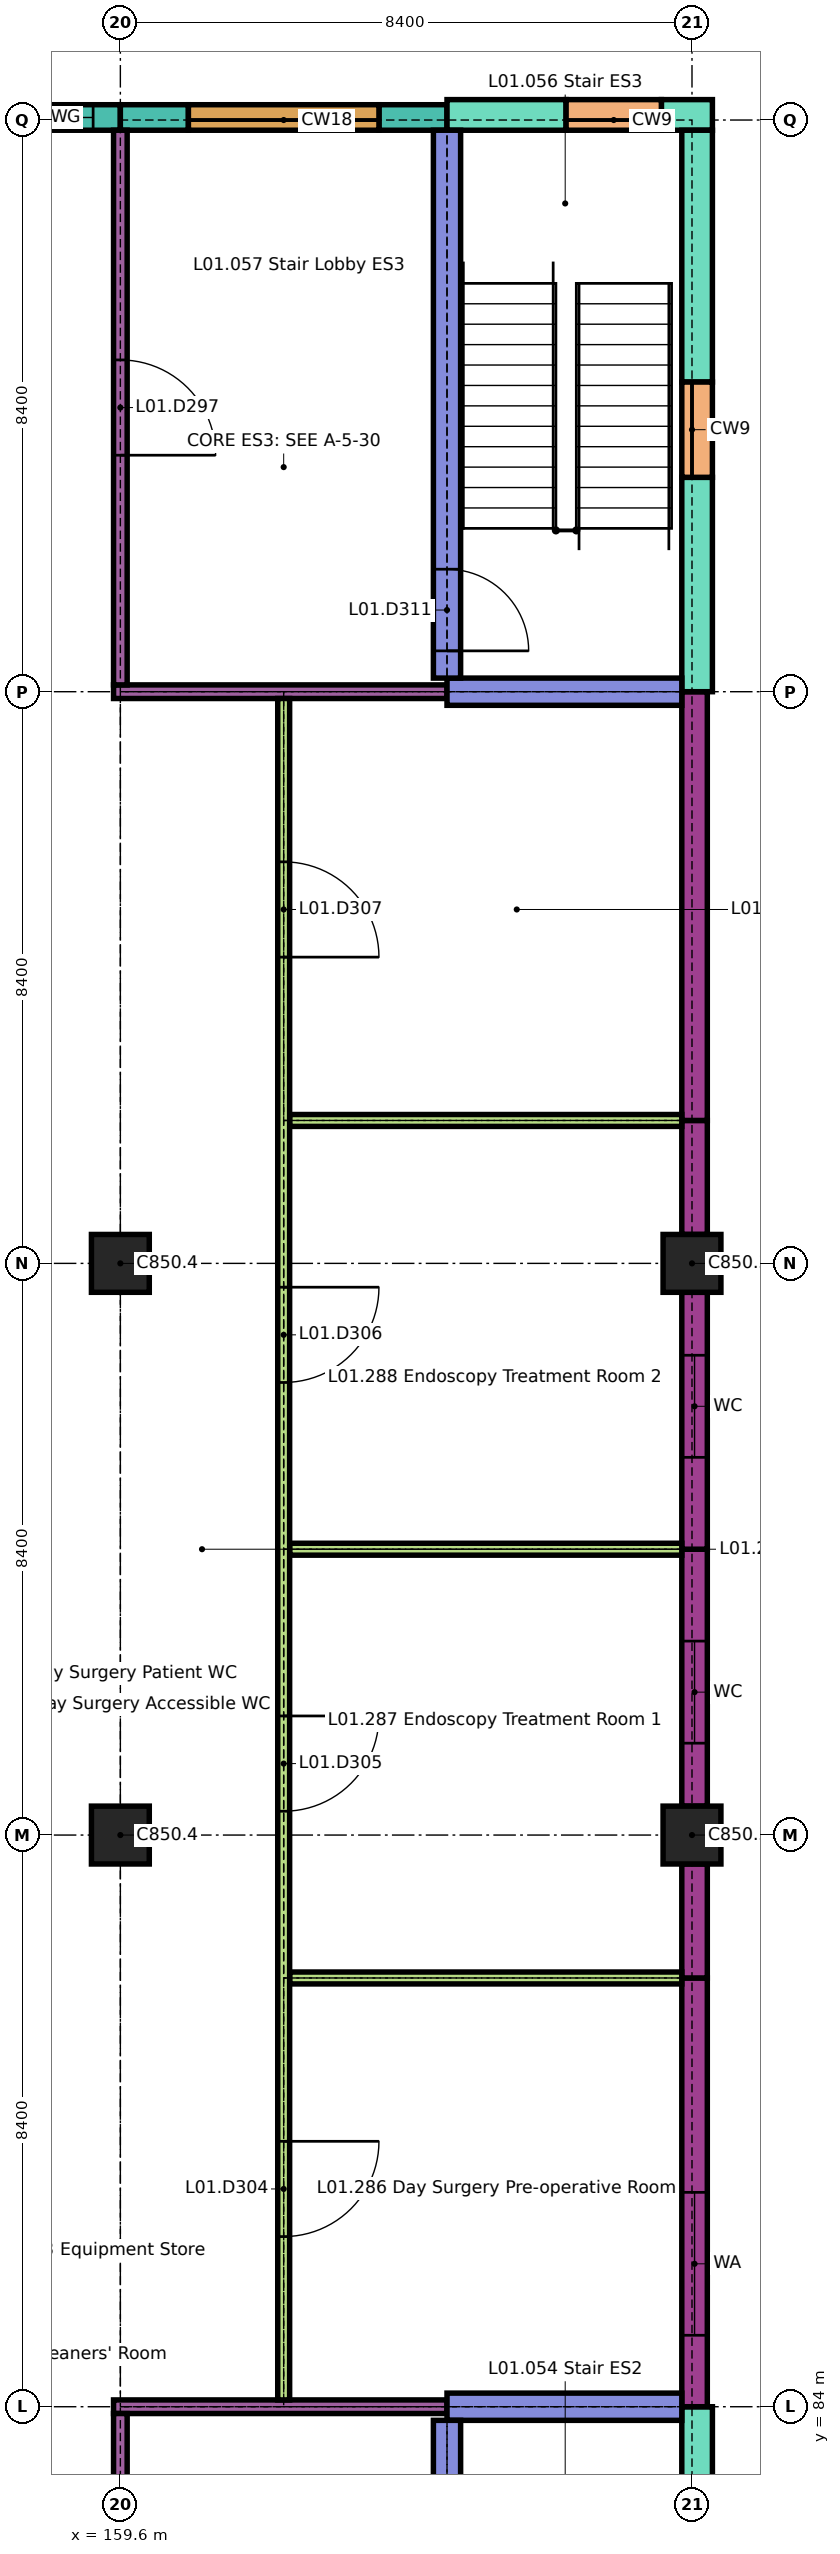
"""IFC4 building model, lengths in metres.
Left out: names, types, materials, properties, quantities, classifications, styles, units other than length and angle.
Written with IfcOpenShell. Run it as: python <this file> out.ifc"""

import sys

from ifc_helpers import new_model, si_unit, direction, frame, frame_2d, origin, origin_2d, place, context, subcontext, project, spatial, rectangle, extrude, element, fill, save


model = new_model("IFC4")
c1 = context("Model", 3, precision=1e-05, world=origin(), true_north=direction((0.0, 1.0)))
c2 = subcontext(c1, "Body", "Model", "MODEL_VIEW")
j1 = project(units=[si_unit("LENGTHUNIT", "METRE"), si_unit("PLANEANGLEUNIT", "RADIAN")], contexts=[c1])
p1 = place(None, origin())
s1 = spatial("IfcSite", under=j1, at=p1, CompositionType="ELEMENT")
p2 = place(p1, origin())
s2 = spatial("IfcBuilding", under=s1, at=p2, CompositionType="ELEMENT")
p3 = place(p2, frame((0.0, 0.0, 4.5)))
s3 = spatial("IfcBuildingStorey", under=s2, at=p3, CompositionType="ELEMENT", Elevation=4.5)
for number, where, z_axis, x_axis in (
    (1, (159.6, 92.4, 0.0), (0.0, 0.0, 1.0), (1.0, 0.0, 0.0)),
    (2, (168.0, 92.4, 0.0), (0.0, 0.0, 1.0), (1.0, 0.0, 0.0)),
    (3, (159.6, 100.8, 0.0), (0.0, 0.0, 1.0), (1.0, 0.0, 0.0)),
    (4, (168.0, 100.8, 0.0), (0.0, 0.0, 1.0), (1.0, 0.0, 0.0)),
):
    element("IfcColumn", number, at=place(p3, frame(where, z_axis=z_axis, x_axis=x_axis)), inside=s3, PredefinedType="COLUMN", context=c2, shape_type="SweptSolid", body=[
        extrude(rectangle(XDim=0.85, YDim=0.85, at=origin_2d()), origin(), (0.0, 0.0, 1.0), 3.45),
    ])
p4 = place(p3, frame((157.0, 117.637, 0.0), z_axis=(0.0, 0.0, 1.0), x_axis=(1.0, 0.0, 0.0)))
e5 = element("IfcWall", 5, at=p4, inside=s3, PredefinedType="SOLIDWALL", context=c2, shape_type="SweptSolid", body=[
    extrude(rectangle(XDim=2.6, YDim=0.375, at=frame_2d((1.3, 0.0))), origin(), (0.0, 0.0, 1.0), 3.45),
])
p5 = place(p4, frame((0.4, 0.0, 0.9)))
e6 = element("IfcOpeningElement", 6, at=p5, cuts=e5, PredefinedType="OPENING", context=c2, shape_type="SweptSolid", body=[
    extrude(rectangle(XDim=1.8, YDim=1.5, at=frame_2d((0.9, 0.75))), frame((0.0, 0.198, 0.0), z_axis=(0.0, -1.0, 0.0), x_axis=(1.0, 0.0, 0.0)), (0.0, 0.0, 1.0), 0.395),
])
for number, where, z_axis, x_axis in (
    (7, (159.6, 117.637, 0.0), (0.0, 0.0, 1.0), (1.0, 0.0, 0.0)),
    (8, (163.4, 117.637, 0.0), (0.0, 0.0, 1.0), (1.0, 0.0, 0.0)),
):
    element("IfcWall", number, at=place(p3, frame(where, z_axis=z_axis, x_axis=x_axis)), inside=s3, PredefinedType="SOLIDWALL", context=c2, shape_type="SweptSolid", body=[
        extrude(rectangle(XDim=1.0, YDim=0.375, at=frame_2d((0.5, 0.0))), origin(), (0.0, 0.0, 1.0), 3.45),
    ])
p6 = place(p3, frame((160.6, 117.637, 0.0), z_axis=(0.0, 0.0, 1.0), x_axis=(1.0, 0.0, 0.0)))
e9 = element("IfcWall", 9, at=p6, inside=s3, PredefinedType="SOLIDWALL", context=c2, shape_type="SweptSolid", body=[
    extrude(rectangle(XDim=2.8, YDim=0.375, at=frame_2d((1.4, 0.0))), origin(), (0.0, 0.0, 1.0), 0.6),
])
p7 = place(p3, frame((164.4, 117.675, 0.0), z_axis=(0.0, 0.0, 1.0), x_axis=(1.0, 0.0, 0.0)))
e10 = element("IfcWall", 10, at=p7, inside=s3, PredefinedType="SOLIDWALL", context=c2, shape_type="SweptSolid", body=[
    extrude(rectangle(XDim=1.75, YDim=0.45, at=frame_2d((0.875, 0.0))), origin(), (0.0, 0.0, 1.0), 3.45),
])
p8 = place(p3, frame((167.55, 117.675, 0.0), z_axis=(0.0, 0.0, 1.0), x_axis=(1.0, 0.0, 0.0)))
e11 = element("IfcWall", 11, at=p8, inside=s3, PredefinedType="SOLIDWALL", context=c2, shape_type="SweptSolid", body=[
    extrude(rectangle(XDim=0.75, YDim=0.45, at=frame_2d((0.375, 0.0))), origin(), (0.0, 0.0, 1.0), 3.45),
])
p9 = place(p3, frame((166.15, 117.675, 0.0), z_axis=(0.0, 0.0, 1.0), x_axis=(1.0, 0.0, 0.0)))
e12 = element("IfcWall", 12, at=p9, inside=s3, PredefinedType="SOLIDWALL", context=c2, shape_type="SweptSolid", body=[
    extrude(rectangle(XDim=1.4, YDim=0.45, at=frame_2d((0.7, 0.0))), origin(), (0.0, 0.0, 1.0), 0.6),
])
p10 = place(p3, frame((168.075, 80.15, 0.0), z_axis=(0.0, 0.0, 1.0), x_axis=(0.0, 1.0, 0.0)))
e13 = element("IfcWall", 13, at=p10, inside=s3, PredefinedType="SOLIDWALL", context=c2, shape_type="SweptSolid", body=[
    extrude(rectangle(XDim=3.85, YDim=0.45, at=frame_2d((1.925, 0.0))), origin(), (0.0, 0.0, 1.0), 3.45),
])
p11 = place(p3, frame((168.038, 84.0, 0.0), z_axis=(0.0, 0.0, 1.0), x_axis=(0.0, 1.0, 0.0)))
e14 = element("IfcWall", 14, at=p11, inside=s3, PredefinedType="SOLIDWALL", context=c2, shape_type="SweptSolid", body=[
    extrude(rectangle(XDim=6.3, YDim=0.375, at=frame_2d((3.15, 0.0))), origin(), (0.0, 0.0, 1.0), 3.15),
])
p12 = place(p11, frame((1.05, 0.0, 0.9)))
e15 = element("IfcOpeningElement", 15, at=p12, cuts=e14, PredefinedType="OPENING", context=c2, shape_type="SweptSolid", body=[
    extrude(rectangle(XDim=2.1, YDim=1.5, at=frame_2d((1.05, 0.75))), frame((0.0, 0.198, 0.0), z_axis=(0.0, -1.0, 0.0), x_axis=(1.0, 0.0, 0.0)), (0.0, 0.0, 1.0), 0.395),
])
p13 = place(p3, frame((168.038, 90.3, 0.0), z_axis=(0.0, 0.0, 1.0), x_axis=(0.0, 1.0, 0.0)))
e16 = element("IfcWall", 16, at=p13, inside=s3, PredefinedType="SOLIDWALL", context=c2, shape_type="SweptSolid", body=[
    extrude(rectangle(XDim=1.675, YDim=0.375, at=frame_2d((0.837, 0.0))), origin(), (0.0, 0.0, 1.0), 3.15),
])
p14 = place(p3, frame((168.038, 92.825, 0.0), z_axis=(0.0, 0.0, 1.0), x_axis=(0.0, 1.0, 0.0)))
e17 = element("IfcWall", 17, at=p14, inside=s3, PredefinedType="SOLIDWALL", context=c2, shape_type="SweptSolid", body=[
    extrude(rectangle(XDim=3.775, YDim=0.375, at=frame_2d((1.888, 0.0))), origin(), (0.0, 0.0, 1.0), 3.15),
])
p15 = place(p14, frame((0.925, 0.0, 0.9)))
e18 = element("IfcOpeningElement", 18, at=p15, cuts=e17, PredefinedType="OPENING", context=c2, shape_type="SweptSolid", body=[
    extrude(rectangle(XDim=1.5, YDim=1.5, at=frame_2d((0.75, 0.75))), frame((0.0, 0.198, 0.0), z_axis=(0.0, -1.0, 0.0), x_axis=(1.0, 0.0, 0.0)), (0.0, 0.0, 1.0), 0.395),
])
p16 = place(p3, frame((168.038, 96.6, 0.0), z_axis=(0.0, 0.0, 1.0), x_axis=(0.0, 1.0, 0.0)))
e19 = element("IfcWall", 19, at=p16, inside=s3, PredefinedType="SOLIDWALL", context=c2, shape_type="SweptSolid", body=[
    extrude(rectangle(XDim=3.775, YDim=0.375, at=frame_2d((1.887, 0.0))), origin(), (0.0, 0.0, 1.0), 3.15),
])
p17 = place(p16, frame((1.35, 0.0, 0.9)))
e20 = element("IfcOpeningElement", 20, at=p17, cuts=e19, PredefinedType="OPENING", context=c2, shape_type="SweptSolid", body=[
    extrude(rectangle(XDim=1.5, YDim=1.5, at=frame_2d((0.75, 0.75))), frame((0.0, 0.198, 0.0), z_axis=(0.0, -1.0, 0.0), x_axis=(1.0, 0.0, 0.0)), (0.0, 0.0, 1.0), 0.395),
])
p18 = place(p3, frame((168.038, 101.225, 0.0), z_axis=(0.0, 0.0, 1.0), x_axis=(0.0, 1.0, 0.0)))
e21 = element("IfcWall", 21, at=p18, inside=s3, PredefinedType="SOLIDWALL", context=c2, shape_type="SweptSolid", body=[
    extrude(rectangle(XDim=1.675, YDim=0.375, at=frame_2d((0.837, 0.0))), origin(), (0.0, 0.0, 1.0), 3.15),
])
p19 = place(p3, frame((168.038, 102.9, 0.0), z_axis=(0.0, 0.0, 1.0), x_axis=(0.0, 1.0, 0.0)))
e22 = element("IfcWall", 22, at=p19, inside=s3, PredefinedType="SOLIDWALL", context=c2, shape_type="SweptSolid", body=[
    extrude(rectangle(XDim=6.3, YDim=0.375, at=frame_2d((3.15, 0.0))), origin(), (0.0, 0.0, 1.0), 3.15),
])
p20 = place(p3, frame((168.075, 109.2, 0.0), z_axis=(0.0, 0.0, 1.0), x_axis=(0.0, 1.0, 0.0)))
e23 = element("IfcWall", 23, at=p20, inside=s3, PredefinedType="SOLIDWALL", context=c2, shape_type="SweptSolid", body=[
    extrude(rectangle(XDim=3.15, YDim=0.45, at=frame_2d((1.575, 0.0))), origin(), (0.0, 0.0, 1.0), 3.45),
])
p21 = place(p3, frame((168.075, 113.75, 0.0), z_axis=(0.0, 0.0, 1.0), x_axis=(0.0, 1.0, 0.0)))
e24 = element("IfcWall", 24, at=p21, inside=s3, PredefinedType="SOLIDWALL", context=c2, shape_type="SweptSolid", body=[
    extrude(rectangle(XDim=3.7, YDim=0.45, at=frame_2d((1.85, 0.0))), origin(), (0.0, 0.0, 1.0), 3.45),
])
p22 = place(p3, frame((168.075, 112.35, 0.0), z_axis=(0.0, 0.0, 1.0), x_axis=(0.0, 1.0, 0.0)))
e25 = element("IfcWall", 25, at=p22, inside=s3, PredefinedType="SOLIDWALL", context=c2, shape_type="SweptSolid", body=[
    extrude(rectangle(XDim=1.4, YDim=0.45, at=frame_2d((0.7, 0.0))), origin(), (0.0, 0.0, 1.0), 0.6),
])
p23 = place(p3, frame((159.5, 84.0, 0.0), z_axis=(0.0, 0.0, 1.0), x_axis=(1.0, 0.0, 0.0)))
e26 = element("IfcWall", 26, at=p23, inside=s3, PredefinedType="PARTITIONING", context=c2, shape_type="SweptSolid", body=[
    extrude(rectangle(XDim=4.9, YDim=0.2, at=frame_2d((2.45, 0.0))), origin(), (0.0, 0.0, 1.0), 3.45),
])
p24 = place(p3, frame((164.4, 84.0, 0.0), z_axis=(0.0, 0.0, 1.0), x_axis=(1.0, 0.0, 0.0)))
e27 = element("IfcWall", 27, at=p24, inside=s3, PredefinedType="SHEAR", context=c2, shape_type="SweptSolid", body=[
    extrude(rectangle(XDim=3.45, YDim=0.4, at=frame_2d((1.725, 0.0))), origin(), (0.0, 0.0, 1.0), 3.45),
])
for number, where, z_axis, x_axis in (
    (28, (162.087, 90.3, 0.0), (0.0, 0.0, 1.0), (1.0, 0.0, 0.0)),
    (29, (162.087, 96.6, 0.0), (0.0, 0.0, 1.0), (1.0, 0.0, 0.0)),
    (30, (162.087, 102.9, 0.0), (0.0, 0.0, 1.0), (1.0, 0.0, 0.0)),
):
    element("IfcWall", number, at=place(p3, frame(where, z_axis=z_axis, x_axis=x_axis)), inside=s3, PredefinedType="PARTITIONING", context=c2, shape_type="SweptSolid", body=[
        extrude(rectangle(XDim=5.763, YDim=0.175, at=frame_2d((2.881, 0.0))), origin(), (0.0, 0.0, 1.0), 3.6),
    ])
p25 = place(p3, frame((159.5, 109.2, 0.0), z_axis=(0.0, 0.0, 1.0), x_axis=(1.0, 0.0, 0.0)))
e31 = element("IfcWall", 31, at=p25, inside=s3, PredefinedType="PARTITIONING", context=c2, shape_type="SweptSolid", body=[
    extrude(rectangle(XDim=4.9, YDim=0.2, at=frame_2d((2.45, 0.0))), origin(), (0.0, 0.0, 1.0), 3.45),
])
p26 = place(p3, frame((164.4, 109.2, 0.0), z_axis=(0.0, 0.0, 1.0), x_axis=(1.0, 0.0, 0.0)))
e32 = element("IfcWall", 32, at=p26, inside=s3, PredefinedType="SHEAR", context=c2, shape_type="SweptSolid", body=[
    extrude(rectangle(XDim=3.45, YDim=0.4, at=frame_2d((1.725, 0.0))), origin(), (0.0, 0.0, 1.0), 3.45),
])
p27 = place(p3, frame((159.6, 75.7, 0.0), z_axis=(0.0, 0.0, 1.0), x_axis=(0.0, 1.0, 0.0)))
e33 = element("IfcWall", 33, at=p27, inside=s3, PredefinedType="PARTITIONING", context=c2, shape_type="SweptSolid", body=[
    extrude(rectangle(XDim=8.2, YDim=0.2, at=frame_2d((4.1, 0.0))), origin(), (0.0, 0.0, 1.0), 3.45),
])
p28 = place(p27, frame((3.4, 0.0, 0.0)))
e34 = element("IfcOpeningElement", 34, at=p28, cuts=e33, PredefinedType="OPENING", context=c2, shape_type="SweptSolid", body=[
    extrude(rectangle(XDim=1.4, YDim=2.1, at=frame_2d((0.7, 1.05))), frame((0.0, 0.11, 0.0), z_axis=(0.0, -1.0, 0.0), x_axis=(1.0, 0.0, 0.0)), (0.0, 0.0, 1.0), 0.22),
])
p29 = place(p3, frame((159.6, 109.3, 0.0), z_axis=(0.0, 0.0, 1.0), x_axis=(0.0, 1.0, 0.0)))
e35 = element("IfcWall", 35, at=p29, inside=s3, PredefinedType="PARTITIONING", context=c2, shape_type="SweptSolid", body=[
    extrude(rectangle(XDim=8.15, YDim=0.2, at=frame_2d((4.075, 0.0))), origin(), (0.0, 0.0, 1.0), 3.45),
])
p30 = place(p29, frame((3.375, 0.0, 0.0)))
e36 = element("IfcOpeningElement", 36, at=p30, cuts=e35, PredefinedType="OPENING", context=c2, shape_type="SweptSolid", body=[
    extrude(rectangle(XDim=1.4, YDim=2.1, at=frame_2d((0.7, 1.05))), frame((0.0, 0.11, 0.0), z_axis=(0.0, -1.0, 0.0), x_axis=(1.0, 0.0, 0.0)), (0.0, 0.0, 1.0), 0.22),
])
p31 = place(p3, frame((162.0, 84.1, 0.0), z_axis=(0.0, 0.0, 1.0), x_axis=(0.0, 1.0, 0.0)))
e37 = element("IfcWall", 37, at=p31, inside=s3, PredefinedType="PARTITIONING", context=c2, shape_type="SweptSolid", body=[
    extrude(rectangle(XDim=25.0, YDim=0.175, at=frame_2d((12.5, 0.0))), origin(), (0.0, 0.0, 1.0), 3.6),
])
p32 = place(p31, frame((2.4, 0.0, 0.0)))
e38 = element("IfcOpeningElement", 38, at=p32, cuts=e37, PredefinedType="OPENING", context=c2, shape_type="SweptSolid", body=[
    extrude(rectangle(XDim=1.4, YDim=2.1, at=frame_2d((0.7, 1.05))), frame((0.0, 0.097, 0.0), z_axis=(0.0, -1.0, 0.0), x_axis=(1.0, 0.0, 0.0)), (0.0, 0.0, 1.0), 0.195),
])
p33 = place(p31, frame((8.65, 0.0, 0.0)))
e39 = element("IfcOpeningElement", 39, at=p33, cuts=e37, PredefinedType="OPENING", context=c2, shape_type="SweptSolid", body=[
    extrude(rectangle(XDim=1.4, YDim=2.1, at=frame_2d((0.7, 1.05))), frame((0.0, 0.097, 0.0), z_axis=(0.0, -1.0, 0.0), x_axis=(1.0, 0.0, 0.0)), (0.0, 0.0, 1.0), 0.195),
])
p34 = place(p31, frame((14.95, 0.0, 0.0)))
e40 = element("IfcOpeningElement", 40, at=p34, cuts=e37, PredefinedType="OPENING", context=c2, shape_type="SweptSolid", body=[
    extrude(rectangle(XDim=1.4, YDim=2.1, at=frame_2d((0.7, 1.05))), frame((0.0, 0.097, 0.0), z_axis=(0.0, -1.0, 0.0), x_axis=(1.0, 0.0, 0.0)), (0.0, 0.0, 1.0), 0.195),
])
p35 = place(p31, frame((21.2, 0.0, 0.0)))
e41 = element("IfcOpeningElement", 41, at=p35, cuts=e37, PredefinedType="OPENING", context=c2, shape_type="SweptSolid", body=[
    extrude(rectangle(XDim=1.4, YDim=2.1, at=frame_2d((0.7, 1.05))), frame((0.0, 0.097, 0.0), z_axis=(0.0, -1.0, 0.0), x_axis=(1.0, 0.0, 0.0)), (0.0, 0.0, 1.0), 0.195),
])
p36 = place(p3, frame((164.4, 75.8, 0.0), z_axis=(0.0, 0.0, 1.0), x_axis=(0.0, 1.0, 0.0)))
e42 = element("IfcWall", 42, at=p36, inside=s3, PredefinedType="SHEAR", context=c2, shape_type="SweptSolid", body=[
    extrude(rectangle(XDim=8.0, YDim=0.4, at=frame_2d((4.0, 0.0))), origin(), (0.0, 0.0, 1.0), 3.45),
])
p37 = place(p36, frame((0.4, 0.0, 0.0)))
e43 = element("IfcOpeningElement", 43, at=p37, cuts=e42, PredefinedType="OPENING", context=c2, shape_type="SweptSolid", body=[
    extrude(rectangle(XDim=1.2, YDim=2.1, at=frame_2d((0.6, 1.05))), frame((0.0, 0.21, 0.0), z_axis=(0.0, -1.0, 0.0), x_axis=(1.0, 0.0, 0.0)), (0.0, 0.0, 1.0), 0.42),
])
p38 = place(p3, frame((164.4, 109.4, 0.0), z_axis=(0.0, 0.0, 1.0), x_axis=(0.0, 1.0, 0.0)))
e44 = element("IfcWall", 44, at=p38, inside=s3, PredefinedType="SHEAR", context=c2, shape_type="SweptSolid", body=[
    extrude(rectangle(XDim=8.05, YDim=0.4, at=frame_2d((4.025, 0.0))), origin(), (0.0, 0.0, 1.0), 3.45),
])
p39 = place(p38, frame((0.4, 0.0, 0.0)))
e45 = element("IfcOpeningElement", 45, at=p39, cuts=e44, PredefinedType="OPENING", context=c2, shape_type="SweptSolid", body=[
    extrude(rectangle(XDim=1.2, YDim=2.1, at=frame_2d((0.6, 1.05))), frame((0.0, 0.21, 0.0), z_axis=(0.0, -1.0, 0.0), x_axis=(1.0, 0.0, 0.0)), (0.0, 0.0, 1.0), 0.42),
])
p40 = place(p5, origin())
e46 = element("IfcWindow", 46, at=p40, inside=s3, PartitioningType="DOUBLE_PANEL_VERTICAL", PredefinedType="WINDOW", context=c2, shape_type="SweptSolid", body=[
    extrude(rectangle(XDim=1.8, YDim=1.5, at=frame_2d((0.9, 0.75))), frame((0.0, 0.03, 0.0), z_axis=(0.0, -1.0, 0.0), x_axis=(1.0, 0.0, 0.0)), (0.0, 0.0, 1.0), 0.06),
])
fill(e6, e46)
p41 = place(p12, origin())
e47 = element("IfcWindow", 47, at=p41, inside=s3, PartitioningType="DOUBLE_PANEL_VERTICAL", PredefinedType="WINDOW", context=c2, shape_type="SweptSolid", body=[
    extrude(rectangle(XDim=2.1, YDim=1.5, at=frame_2d((1.05, 0.75))), frame((0.0, 0.03, 0.0), z_axis=(0.0, -1.0, 0.0), x_axis=(1.0, 0.0, 0.0)), (0.0, 0.0, 1.0), 0.06),
])
fill(e15, e47)
p42 = place(p15, origin())
e48 = element("IfcWindow", 48, at=p42, inside=s3, PartitioningType="SINGLE_PANEL", PredefinedType="WINDOW", context=c2, shape_type="SweptSolid", body=[
    extrude(rectangle(XDim=1.5, YDim=1.5, at=frame_2d((0.75, 0.75))), frame((0.0, 0.03, 0.0), z_axis=(0.0, -1.0, 0.0), x_axis=(1.0, 0.0, 0.0)), (0.0, 0.0, 1.0), 0.06),
])
fill(e18, e48)
p43 = place(p17, origin())
e49 = element("IfcWindow", 49, at=p43, inside=s3, PartitioningType="SINGLE_PANEL", PredefinedType="WINDOW", context=c2, shape_type="SweptSolid", body=[
    extrude(rectangle(XDim=1.5, YDim=1.5, at=frame_2d((0.75, 0.75))), frame((0.0, 0.03, 0.0), z_axis=(0.0, -1.0, 0.0), x_axis=(1.0, 0.0, 0.0)), (0.0, 0.0, 1.0), 0.06),
])
fill(e20, e49)
p44 = place(p30, origin())
e50 = element("IfcDoor", 50, at=p44, inside=s3, OperationType="SINGLE_SWING_LEFT", PredefinedType="DOOR", context=c2, shape_type="SweptSolid", body=[
    extrude(rectangle(XDim=1.4, YDim=2.1, at=frame_2d((0.7, 1.05))), frame((0.0, 0.03, 0.0), z_axis=(0.0, -1.0, 0.0), x_axis=(1.0, 0.0, 0.0)), (0.0, 0.0, 1.0), 0.06),
])
fill(e36, e50)
p45 = place(p32, origin())
e51 = element("IfcDoor", 51, at=p45, inside=s3, OperationType="SINGLE_SWING_RIGHT", PredefinedType="DOOR", context=c2, shape_type="SweptSolid", body=[
    extrude(rectangle(XDim=1.4, YDim=2.1, at=frame_2d((0.7, 1.05))), frame((0.0, 0.025, 0.0), z_axis=(0.0, -1.0, 0.0), x_axis=(1.0, 0.0, 0.0)), (0.0, 0.0, 1.0), 0.05),
])
fill(e38, e51)
p46 = place(p33, origin())
e52 = element("IfcDoor", 52, at=p46, inside=s3, OperationType="SINGLE_SWING_RIGHT", PredefinedType="DOOR", context=c2, shape_type="SweptSolid", body=[
    extrude(rectangle(XDim=1.4, YDim=2.1, at=frame_2d((0.7, 1.05))), frame((0.0, 0.025, 0.0), z_axis=(0.0, -1.0, 0.0), x_axis=(1.0, 0.0, 0.0)), (0.0, 0.0, 1.0), 0.05),
])
fill(e39, e52)
p47 = place(p34, origin())
e53 = element("IfcDoor", 53, at=p47, inside=s3, OperationType="SINGLE_SWING_RIGHT", PredefinedType="DOOR", context=c2, shape_type="SweptSolid", body=[
    extrude(rectangle(XDim=1.4, YDim=2.1, at=frame_2d((0.7, 1.05))), frame((0.0, 0.025, 0.0), z_axis=(0.0, -1.0, 0.0), x_axis=(1.0, 0.0, 0.0)), (0.0, 0.0, 1.0), 0.05),
])
fill(e40, e53)
p48 = place(p35, origin())
e54 = element("IfcDoor", 54, at=p48, inside=s3, OperationType="SINGLE_SWING_LEFT", PredefinedType="DOOR", context=c2, shape_type="SweptSolid", body=[
    extrude(rectangle(XDim=1.4, YDim=2.1, at=frame_2d((0.7, 1.05))), frame((0.0, 0.025, 0.0), z_axis=(0.0, -1.0, 0.0), x_axis=(1.0, 0.0, 0.0)), (0.0, 0.0, 1.0), 0.05),
])
fill(e41, e54)
p49 = place(p39, origin())
e55 = element("IfcDoor", 55, at=p49, inside=s3, OperationType="SINGLE_SWING_LEFT", PredefinedType="DOOR", context=c2, shape_type="SweptSolid", body=[
    extrude(rectangle(XDim=1.2, YDim=2.1, at=frame_2d((0.6, 1.05))), frame((0.0, 0.025, 0.0), z_axis=(0.0, -1.0, 0.0), x_axis=(1.0, 0.0, 0.0)), (0.0, 0.0, 1.0), 0.05),
])
fill(e45, e55)
save(model, sys.argv[1])
